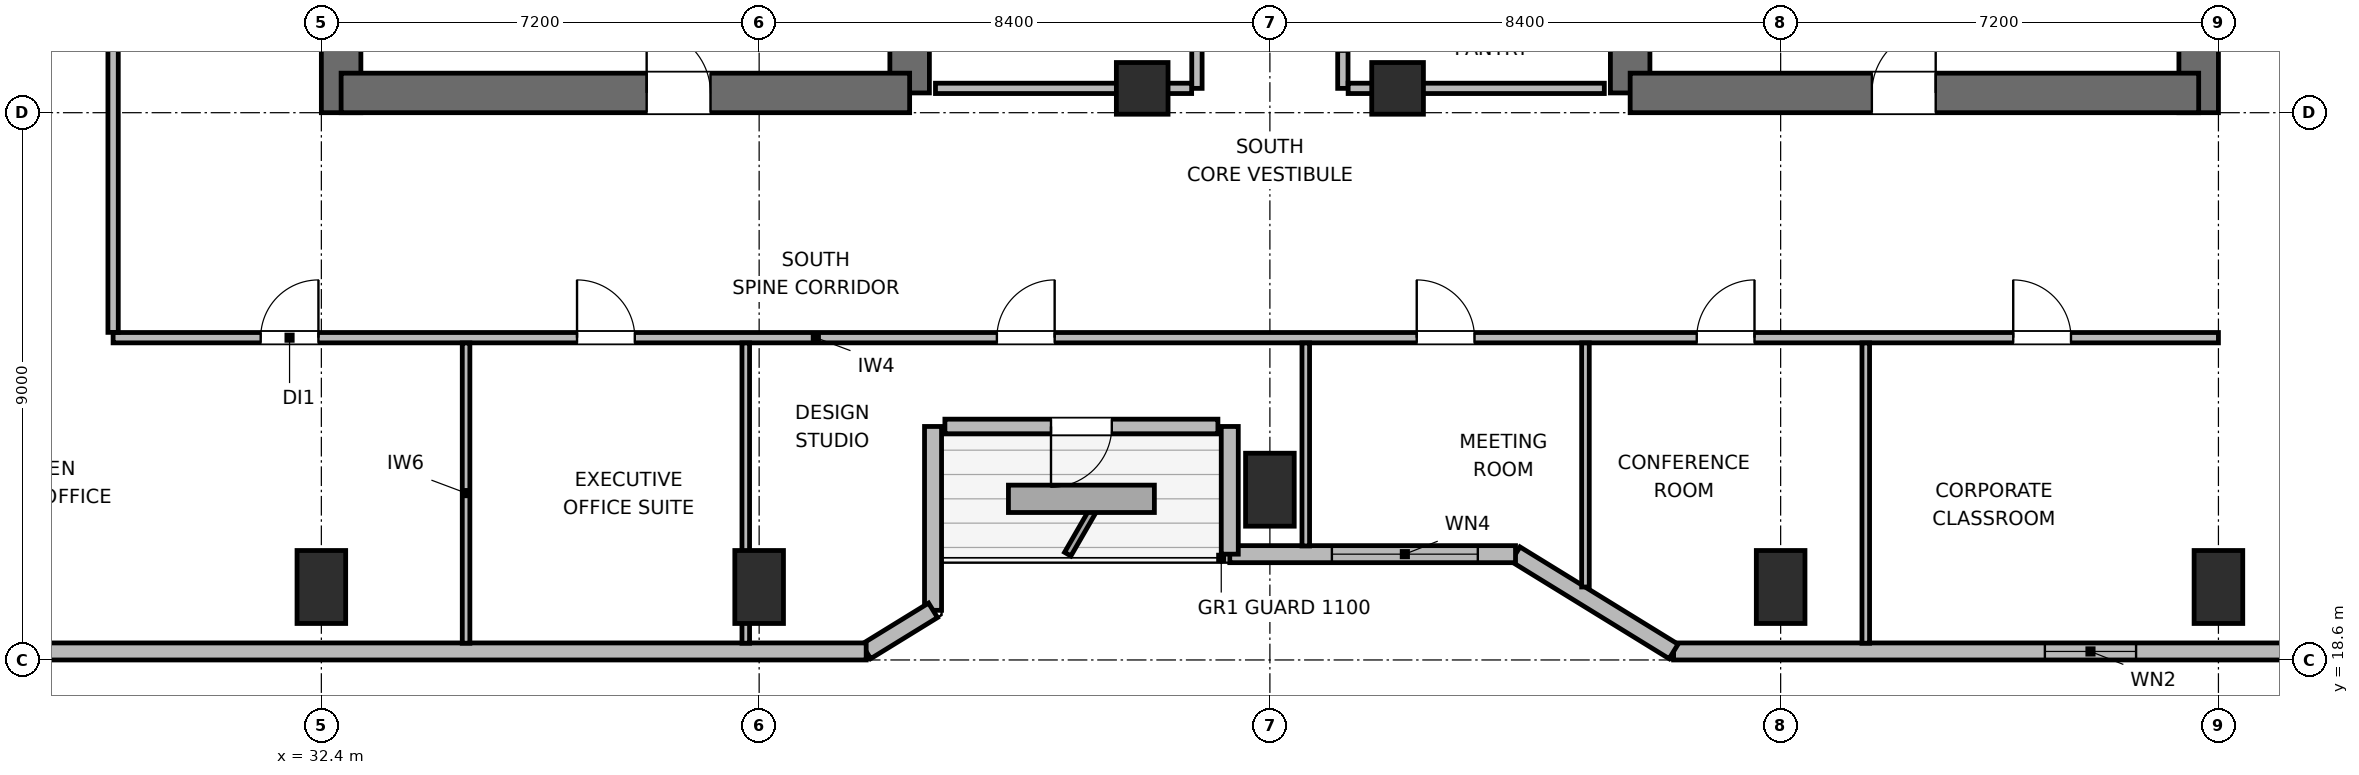
"""IFC4 building model, lengths in metres.
Left out: names, types, materials, properties, quantities, classifications, styles, units other than length and angle.
Written with IfcOpenShell. Run it as: python <this file> out.ifc"""

import sys

from ifc_helpers import new_model, si_unit, direction, frame, frame_2d, origin, origin_2d, place, context, subcontext, project, spatial, rectangle, extrude, element, fill, save


model = new_model("IFC4")
c1 = context("Model", 3, precision=1e-05, world=origin(), true_north=direction((0.0, 1.0)))
c2 = subcontext(c1, "Body", "Model", "MODEL_VIEW")
j1 = project(units=[si_unit("LENGTHUNIT", "METRE"), si_unit("PLANEANGLEUNIT", "RADIAN")], contexts=[c1])
p1 = place(None, origin())
s1 = spatial("IfcSite", under=j1, at=p1, CompositionType="ELEMENT")
p2 = place(p1, origin())
s2 = spatial("IfcBuilding", under=s1, at=p2, CompositionType="ELEMENT")
p3 = place(p2, frame((0.0, 0.0, 201.9)))
s3 = spatial("IfcBuildingStorey", under=s2, at=p3, CompositionType="ELEMENT", Elevation=201.9)
p4 = place(p3, frame((32.725, 27.6, 0.0), z_axis=(0.0, 0.0, 1.0), x_axis=(0.0, 1.0, 0.0)))
e1 = element("IfcWall", 1, at=p4, inside=s3, PredefinedType="SHEAR", context=c2, shape_type="SweptSolid", body=[
    extrude(rectangle(XDim=16.8, YDim=0.65, at=frame_2d((8.4, 0.0))), origin(), (0.0, 0.0, 1.0), 3.9),
])
p5 = place(p3, frame((42.075, 27.925, 0.0), z_axis=(0.0, 0.0, 1.0), x_axis=(0.0, 1.0, 0.0)))
e2 = element("IfcWall", 2, at=p5, inside=s3, PredefinedType="SHEAR", context=c2, shape_type="SweptSolid", body=[
    extrude(rectangle(XDim=6.475, YDim=0.65, at=frame_2d((3.237, 0.0))), origin(), (0.0, 0.0, 1.0), 3.9),
])
p6 = place(p3, frame((32.725, 27.925, 0.0), z_axis=(0.0, 0.0, 1.0), x_axis=(1.0, 0.0, 0.0)))
e3 = element("IfcWall", 3, at=p6, inside=s3, PredefinedType="SHEAR", context=c2, shape_type="SweptSolid", body=[
    extrude(rectangle(XDim=9.35, YDim=0.65, at=frame_2d((4.675, 0.0))), origin(), (0.0, 0.0, 1.0), 3.9),
])
p7 = place(p6, frame((5.025, 0.0, 0.0)))
e4 = element("IfcOpeningElement", 4, at=p7, cuts=e3, PredefinedType="OPENING", context=c2, shape_type="SweptSolid", body=[
    extrude(rectangle(XDim=1.05, YDim=2.04, at=frame_2d((0.525, 1.02))), frame((0.0, 0.335, 0.0), z_axis=(0.0, -1.0, 0.0), x_axis=(1.0, 0.0, 0.0)), (0.0, 0.0, 1.0), 0.67),
])
p8 = place(p3, frame((53.925, 27.925, 0.0), z_axis=(0.0, 0.0, 1.0), x_axis=(0.0, 1.0, 0.0)))
e5 = element("IfcWall", 5, at=p8, inside=s3, PredefinedType="SHEAR", context=c2, shape_type="SweptSolid", body=[
    extrude(rectangle(XDim=7.875, YDim=0.65, at=frame_2d((3.938, 0.0))), origin(), (0.0, 0.0, 1.0), 3.9),
])
p9 = place(p3, frame((63.275, 27.6, 0.0), z_axis=(0.0, 0.0, 1.0), x_axis=(0.0, 1.0, 0.0)))
e6 = element("IfcWall", 6, at=p9, inside=s3, PredefinedType="SHEAR", context=c2, shape_type="SweptSolid", body=[
    extrude(rectangle(XDim=16.8, YDim=0.65, at=frame_2d((8.4, 0.0))), origin(), (0.0, 0.0, 1.0), 3.9),
])
p10 = place(p3, frame((53.925, 27.925, 0.0), z_axis=(0.0, 0.0, 1.0), x_axis=(1.0, 0.0, 0.0)))
e7 = element("IfcWall", 7, at=p10, inside=s3, PredefinedType="SHEAR", context=c2, shape_type="SweptSolid", body=[
    extrude(rectangle(XDim=9.35, YDim=0.65, at=frame_2d((4.675, 0.0))), origin(), (0.0, 0.0, 1.0), 3.9),
])
p11 = place(p10, frame((3.975, 0.0, 0.0)))
e8 = element("IfcOpeningElement", 8, at=p11, cuts=e7, PredefinedType="OPENING", context=c2, shape_type="SweptSolid", body=[
    extrude(rectangle(XDim=1.05, YDim=2.04, at=frame_2d((0.525, 1.02))), frame((0.0, 0.335, 0.0), z_axis=(0.0, -1.0, 0.0), x_axis=(1.0, 0.0, 0.0)), (0.0, 0.0, 1.0), 0.67),
])
for number, where, z_axis, x_axis in (
    (9, (32.4, 19.8, 0.0), (0.0, 0.0, 1.0), (1.0, 0.0, 0.0)),
    (10, (39.6, 19.8, 0.0), (0.0, 0.0, 1.0), (1.0, 0.0, 0.0)),
    (11, (48.0, 21.4, 0.0), (0.0, 0.0, 1.0), (1.0, 0.0, 0.0)),
    (12, (56.4, 19.8, 0.0), (0.0, 0.0, 1.0), (1.0, 0.0, 0.0)),
    (13, (63.6, 19.8, 0.0), (0.0, 0.0, 1.0), (1.0, 0.0, 0.0)),
):
    element("IfcColumn", number, at=place(p3, frame(where, z_axis=z_axis, x_axis=x_axis)), inside=s3, PredefinedType="COLUMN", context=c2, shape_type="SweptSolid", body=[
        extrude(rectangle(XDim=0.8, YDim=1.2, at=origin_2d()), origin(), (0.0, 0.0, 1.0), 3.9),
    ])
for number, where, z_axis, x_axis in (
    (14, (45.9, 28.0, 0.0), (0.0, 0.0, 1.0), (1.0, 0.0, 0.0)),
    (15, (50.1, 28.0, 0.0), (0.0, 0.0, 1.0), (1.0, 0.0, 0.0)),
):
    element("IfcColumn", number, at=place(p3, frame(where, z_axis=z_axis, x_axis=x_axis)), inside=s3, PredefinedType="COLUMN", context=c2, shape_type="SweptSolid", body=[
        extrude(rectangle(XDim=0.85, YDim=0.85, at=origin_2d()), origin(), (0.0, 0.0, 1.0), 3.9),
    ])
p12 = place(p3, frame((65.382, 18.74, 0.0), z_axis=(0.0, 0.0, 1.0), x_axis=(-1.0, 0.0, 0.0)))
e16 = element("IfcWall", 16, at=p12, inside=s3, PredefinedType="SOLIDWALL", context=c2, shape_type="SweptSolid", body=[
    extrude(rectangle(XDim=10.742, YDim=0.28, at=frame_2d((5.371, 0.0))), origin(), (0.0, 0.0, 1.0), 3.68),
])
p13 = place(p12, frame((3.136, 0.0, 0.85)))
e17 = element("IfcOpeningElement", 17, at=p13, cuts=e16, PredefinedType="OPENING", context=c2, shape_type="SweptSolid", body=[
    extrude(rectangle(XDim=1.5, YDim=1.1, at=frame_2d((0.75, 0.55))), frame((0.0, 0.15, 0.0), z_axis=(0.0, -1.0, 0.0), x_axis=(1.0, 0.0, 0.0)), (0.0, 0.0, 1.0), 0.3),
])
p14 = place(p3, frame((54.64, 18.74, 0.0), z_axis=(0.0, 0.0, 1.0), x_axis=(-0.851652825334, 0.524106349037, 0.0)))
e18 = element("IfcWall", 18, at=p14, inside=s3, PredefinedType="SOLIDWALL", context=c2, shape_type="SweptSolid", body=[
    extrude(rectangle(XDim=3.053, YDim=0.28, at=frame_2d((1.526, 0.0))), origin(), (0.0, 0.0, 1.0), 2.265),
])
p15 = place(p3, frame((52.04, 20.34, 0.0), z_axis=(0.0, 0.0, 1.0), x_axis=(-1.0, 0.0, 0.0)))
e19 = element("IfcWall", 19, at=p15, inside=s3, PredefinedType="SOLIDWALL", context=c2, shape_type="SweptSolid", body=[
    extrude(rectangle(XDim=4.699, YDim=0.28, at=frame_2d((2.35, 0.0))), origin(), (0.0, 0.0, 1.0), 2.265),
])
p16 = place(p15, frame((0.62, 0.0, 0.85)))
e20 = element("IfcOpeningElement", 20, at=p16, cuts=e19, PredefinedType="OPENING", context=c2, shape_type="SweptSolid", body=[
    extrude(rectangle(XDim=2.4, YDim=1.15, at=frame_2d((1.2, 0.575))), frame((0.0, 0.15, 0.0), z_axis=(0.0, -1.0, 0.0), x_axis=(1.0, 0.0, 0.0)), (0.0, 0.0, 1.0), 0.3),
])
p17 = place(p3, frame((47.34, 20.34, 0.0), z_axis=(0.0, 0.0, 1.0), x_axis=(0.0, 1.0, 0.0)))
e21 = element("IfcWall", 21, at=p17, inside=s3, PredefinedType="SOLIDWALL", context=c2, shape_type="SweptSolid", body=[
    extrude(rectangle(XDim=2.1, YDim=0.28, at=frame_2d((1.05, 0.0))), origin(), (0.0, 0.0, 1.0), 2.265),
])
p18 = place(p3, frame((47.145, 22.44, 0.0), z_axis=(0.0, 0.0, 1.0), x_axis=(-1.0, 0.0, 0.0)))
e22 = element("IfcWall", 22, at=p18, inside=s3, PredefinedType="SOLIDWALL", context=c2, shape_type="SweptSolid", body=[
    extrude(rectangle(XDim=4.49, YDim=0.24, at=frame_2d((2.245, 0.0))), origin(), (0.0, 0.0, 1.0), 3.68),
])
p19 = place(p18, frame((1.745, 0.0, 0.0)))
e23 = element("IfcOpeningElement", 23, at=p19, cuts=e22, PredefinedType="OPENING", context=c2, shape_type="SweptSolid", body=[
    extrude(rectangle(XDim=1.0, YDim=2.02, at=frame_2d((0.5, 1.01))), frame((0.0, 0.13, 0.0), z_axis=(0.0, -1.0, 0.0), x_axis=(1.0, 0.0, 0.0)), (0.0, 0.0, 1.0), 0.26),
])
p20 = place(p3, frame((42.46, 22.44, 0.0), z_axis=(0.0, 0.0, 1.0), x_axis=(0.0, -1.0, 0.0)))
e24 = element("IfcWall", 24, at=p20, inside=s3, PredefinedType="SOLIDWALL", context=c2, shape_type="SweptSolid", body=[
    extrude(rectangle(XDim=3.024, YDim=0.28, at=frame_2d((1.512, 0.0))), origin(), (0.0, 0.0, 1.0), 2.265),
])
p21 = place(p3, frame((42.46, 19.416, 0.0), z_axis=(0.0, 0.0, 1.0), x_axis=(-0.851801140441, -0.523865266212, 0.0)))
e25 = element("IfcWall", 25, at=p21, inside=s3, PredefinedType="SOLIDWALL", context=c2, shape_type="SweptSolid", body=[
    extrude(rectangle(XDim=1.291, YDim=0.28, at=frame_2d((0.646, 0.0))), origin(), (0.0, 0.0, 1.0), 3.68),
])
p22 = place(p3, frame((41.36, 18.74, 0.0), z_axis=(0.0, 0.0, 1.0), x_axis=(-1.0, 0.0, 0.0)))
e26 = element("IfcWall", 26, at=p22, inside=s3, PredefinedType="SOLIDWALL", context=c2, shape_type="SweptSolid", body=[
    extrude(rectangle(XDim=17.942, YDim=0.28, at=frame_2d((8.971, 0.0))), origin(), (0.0, 0.0, 1.0), 3.68),
])
p23 = place(p3, frame((46.8, 28.0, 0.0), z_axis=(0.0, 0.0, 1.0), x_axis=(0.0, 1.0, 0.0)))
e27 = element("IfcWall", 27, at=p23, inside=s3, PredefinedType="PARTITIONING", context=c2, shape_type="SweptSolid", body=[
    extrude(rectangle(XDim=4.5, YDim=0.17, at=frame_2d((2.25, 0.0))), origin(), (0.0, 0.0, 1.0), 3.68),
])
p24 = place(p23, frame((1.8, 0.0, 0.0)))
e28 = element("IfcOpeningElement", 28, at=p24, cuts=e27, PredefinedType="OPENING", context=c2, shape_type="SweptSolid", body=[
    extrude(rectangle(XDim=0.9, YDim=2.02, at=frame_2d((0.45, 1.01))), frame((0.0, 0.095, 0.0), z_axis=(0.0, -1.0, 0.0), x_axis=(1.0, 0.0, 0.0)), (0.0, 0.0, 1.0), 0.19),
])
p25 = place(p3, frame((42.5, 28.0, 0.0), z_axis=(0.0, 0.0, 1.0), x_axis=(1.0, 0.0, 0.0)))
e29 = element("IfcWall", 29, at=p25, inside=s3, PredefinedType="PARTITIONING", context=c2, shape_type="SweptSolid", body=[
    extrude(rectangle(XDim=4.213, YDim=0.17, at=frame_2d((2.106, 0.0))), origin(), (0.0, 0.0, 1.0), 2.765),
])
p26 = place(p3, frame((49.2, 28.0, 0.0), z_axis=(0.0, 0.0, 1.0), x_axis=(0.0, 1.0, 0.0)))
e30 = element("IfcWall", 30, at=p26, inside=s3, PredefinedType="PARTITIONING", context=c2, shape_type="SweptSolid", body=[
    extrude(rectangle(XDim=4.5, YDim=0.17, at=frame_2d((2.25, 0.0))), origin(), (0.0, 0.0, 1.0), 3.68),
])
p27 = place(p26, frame((0.605, 0.0, 0.0)))
e31 = element("IfcOpeningElement", 31, at=p27, cuts=e30, PredefinedType="OPENING", context=c2, shape_type="SweptSolid", body=[
    extrude(rectangle(XDim=0.9, YDim=2.02, at=frame_2d((0.45, 1.01))), frame((0.0, 0.095, 0.0), z_axis=(0.0, -1.0, 0.0), x_axis=(1.0, 0.0, 0.0)), (0.0, 0.0, 1.0), 0.19),
])
p28 = place(p26, frame((2.655, 0.0, 0.0)))
e32 = element("IfcOpeningElement", 32, at=p28, cuts=e30, PredefinedType="OPENING", context=c2, shape_type="SweptSolid", body=[
    extrude(rectangle(XDim=0.9, YDim=2.02, at=frame_2d((0.45, 1.01))), frame((0.0, 0.095, 0.0), z_axis=(0.0, -1.0, 0.0), x_axis=(1.0, 0.0, 0.0)), (0.0, 0.0, 1.0), 0.19),
])
p29 = place(p3, frame((49.287, 28.0, 0.0), z_axis=(0.0, 0.0, 1.0), x_axis=(1.0, 0.0, 0.0)))
e33 = element("IfcWall", 33, at=p29, inside=s3, PredefinedType="PARTITIONING", context=c2, shape_type="SweptSolid", body=[
    extrude(rectangle(XDim=4.213, YDim=0.17, at=frame_2d((2.106, 0.0))), origin(), (0.0, 0.0, 1.0), 2.765),
])
p30 = place(p3, frame((28.975, 23.9, 0.0), z_axis=(0.0, 0.0, 1.0), x_axis=(1.0, 0.0, 0.0)))
e34 = element("IfcWall", 34, at=p30, inside=s3, PredefinedType="PARTITIONING", context=c2, shape_type="SweptSolid", body=[
    extrude(rectangle(XDim=34.625, YDim=0.17, at=frame_2d((17.312, 0.0))), origin(), (0.0, 0.0, 1.0), 3.68),
])
p31 = place(p30, frame((2.427, 0.0, 0.0)))
e35 = element("IfcOpeningElement", 35, at=p31, cuts=e34, PredefinedType="OPENING", context=c2, shape_type="SweptSolid", body=[
    extrude(rectangle(XDim=0.95, YDim=2.04, at=frame_2d((0.475, 1.02))), frame((0.0, 0.095, 0.0), z_axis=(0.0, -1.0, 0.0), x_axis=(1.0, 0.0, 0.0)), (0.0, 0.0, 1.0), 0.19),
])
p32 = place(p30, frame((7.63, 0.0, 0.0)))
e36 = element("IfcOpeningElement", 36, at=p32, cuts=e34, PredefinedType="OPENING", context=c2, shape_type="SweptSolid", body=[
    extrude(rectangle(XDim=0.95, YDim=2.04, at=frame_2d((0.475, 1.02))), frame((0.0, 0.095, 0.0), z_axis=(0.0, -1.0, 0.0), x_axis=(1.0, 0.0, 0.0)), (0.0, 0.0, 1.0), 0.19),
])
p33 = place(p30, frame((14.535, 0.0, 0.0)))
e37 = element("IfcOpeningElement", 37, at=p33, cuts=e34, PredefinedType="OPENING", context=c2, shape_type="SweptSolid", body=[
    extrude(rectangle(XDim=0.95, YDim=2.04, at=frame_2d((0.475, 1.02))), frame((0.0, 0.095, 0.0), z_axis=(0.0, -1.0, 0.0), x_axis=(1.0, 0.0, 0.0)), (0.0, 0.0, 1.0), 0.19),
])
p34 = place(p30, frame((21.44, 0.0, 0.0)))
e38 = element("IfcOpeningElement", 38, at=p34, cuts=e34, PredefinedType="OPENING", context=c2, shape_type="SweptSolid", body=[
    extrude(rectangle(XDim=0.95, YDim=2.04, at=frame_2d((0.475, 1.02))), frame((0.0, 0.095, 0.0), z_axis=(0.0, -1.0, 0.0), x_axis=(1.0, 0.0, 0.0)), (0.0, 0.0, 1.0), 0.19),
])
p35 = place(p30, frame((26.045, 0.0, 0.0)))
e39 = element("IfcOpeningElement", 39, at=p35, cuts=e34, PredefinedType="OPENING", context=c2, shape_type="SweptSolid", body=[
    extrude(rectangle(XDim=0.95, YDim=2.04, at=frame_2d((0.475, 1.02))), frame((0.0, 0.095, 0.0), z_axis=(0.0, -1.0, 0.0), x_axis=(1.0, 0.0, 0.0)), (0.0, 0.0, 1.0), 0.19),
])
p36 = place(p30, frame((31.25, 0.0, 0.0)))
e40 = element("IfcOpeningElement", 40, at=p36, cuts=e34, PredefinedType="OPENING", context=c2, shape_type="SweptSolid", body=[
    extrude(rectangle(XDim=0.95, YDim=2.04, at=frame_2d((0.475, 1.02))), frame((0.0, 0.095, 0.0), z_axis=(0.0, -1.0, 0.0), x_axis=(1.0, 0.0, 0.0)), (0.0, 0.0, 1.0), 0.19),
])
p37 = place(p3, frame((28.975, 23.987, 0.0), z_axis=(0.0, 0.0, 1.0), x_axis=(0.0, 1.0, 0.0)))
e41 = element("IfcWall", 41, at=p37, inside=s3, PredefinedType="PARTITIONING", context=c2, shape_type="SweptSolid", body=[
    extrude(rectangle(XDim=10.413, YDim=0.17, at=frame_2d((5.207, 0.0))), origin(), (0.0, 0.0, 1.0), 3.68),
])
p38 = place(p37, frame((4.688, 0.0, 0.0)))
e42 = element("IfcOpeningElement", 42, at=p38, cuts=e41, PredefinedType="OPENING", context=c2, shape_type="SweptSolid", body=[
    extrude(rectangle(XDim=0.95, YDim=2.04, at=frame_2d((0.475, 1.02))), frame((0.0, 0.095, 0.0), z_axis=(0.0, -1.0, 0.0), x_axis=(1.0, 0.0, 0.0)), (0.0, 0.0, 1.0), 0.19),
])
p39 = place(p3, frame((34.78, 18.875, 0.0), z_axis=(0.0, 0.0, 1.0), x_axis=(0.0, 1.0, 0.0)))
e43 = element("IfcWall", 43, at=p39, inside=s3, PredefinedType="PARTITIONING", context=c2, shape_type="SweptSolid", body=[
    extrude(rectangle(XDim=4.938, YDim=0.125, at=frame_2d((2.469, 0.0))), origin(), (0.0, 0.0, 1.0), 3.68),
])
p40 = place(p3, frame((39.38, 18.875, 0.0), z_axis=(0.0, 0.0, 1.0), x_axis=(0.0, 1.0, 0.0)))
e44 = element("IfcWall", 44, at=p40, inside=s3, PredefinedType="PARTITIONING", context=c2, shape_type="SweptSolid", body=[
    extrude(rectangle(XDim=4.938, YDim=0.125, at=frame_2d((2.469, 0.0))), origin(), (0.0, 0.0, 1.0), 3.043),
])
p41 = place(p3, frame((48.59, 20.475, 0.0), z_axis=(0.0, 0.0, 1.0), x_axis=(0.0, 1.0, 0.0)))
e45 = element("IfcWall", 45, at=p41, inside=s3, PredefinedType="PARTITIONING", context=c2, shape_type="SweptSolid", body=[
    extrude(rectangle(XDim=3.338, YDim=0.125, at=frame_2d((1.669, 0.0))), origin(), (0.0, 0.0, 1.0), 3.68),
])
p42 = place(p3, frame((53.19, 19.8, 0.0), z_axis=(0.0, 0.0, 1.0), x_axis=(0.0, 1.0, 0.0)))
e46 = element("IfcWall", 46, at=p42, inside=s3, PredefinedType="PARTITIONING", context=c2, shape_type="SweptSolid", body=[
    extrude(rectangle(XDim=4.013, YDim=0.125, at=frame_2d((2.006, 0.0))), origin(), (0.0, 0.0, 1.0), 3.043),
])
p43 = place(p3, frame((57.8, 18.875, 0.0), z_axis=(0.0, 0.0, 1.0), x_axis=(0.0, 1.0, 0.0)))
e47 = element("IfcWall", 47, at=p43, inside=s3, PredefinedType="PARTITIONING", context=c2, shape_type="SweptSolid", body=[
    extrude(rectangle(XDim=4.938, YDim=0.125, at=frame_2d((2.469, 0.0))), origin(), (0.0, 0.0, 1.0), 3.68),
])
p44 = place(p13, origin())
e48 = element("IfcWindow", 48, at=p44, inside=s3, PartitioningType="SINGLE_PANEL", PredefinedType="WINDOW", context=c2, shape_type="SweptSolid", body=[
    extrude(rectangle(XDim=1.5, YDim=1.1, at=frame_2d((0.75, 0.55))), frame((0.0, 0.03, 0.0), z_axis=(0.0, -1.0, 0.0), x_axis=(1.0, 0.0, 0.0)), (0.0, 0.0, 1.0), 0.06),
])
fill(e17, e48)
p45 = place(p16, origin())
e49 = element("IfcWindow", 49, at=p45, inside=s3, PartitioningType="SINGLE_PANEL", PredefinedType="WINDOW", context=c2, shape_type="SweptSolid", body=[
    extrude(rectangle(XDim=2.4, YDim=1.15, at=frame_2d((1.2, 0.575))), frame((0.0, 0.03, 0.0), z_axis=(0.0, -1.0, 0.0), x_axis=(1.0, 0.0, 0.0)), (0.0, 0.0, 1.0), 0.06),
])
fill(e20, e49)
p46 = place(p19, origin())
e50 = element("IfcDoor", 50, at=p46, inside=s3, OperationType="SINGLE_SWING_RIGHT", PredefinedType="DOOR", context=c2, shape_type="SweptSolid", body=[
    extrude(rectangle(XDim=1.0, YDim=2.02, at=frame_2d((0.5, 1.01))), frame((0.0, 0.025, 0.0), z_axis=(0.0, -1.0, 0.0), x_axis=(1.0, 0.0, 0.0)), (0.0, 0.0, 1.0), 0.05),
])
fill(e23, e50)
p47 = place(p7, origin())
e51 = element("IfcDoor", 51, at=p47, inside=s3, OperationType="SINGLE_SWING_LEFT", PredefinedType="DOOR", context=c2, shape_type="SweptSolid", body=[
    extrude(rectangle(XDim=1.05, YDim=2.04, at=frame_2d((0.525, 1.02))), frame((0.0, 0.025, 0.0), z_axis=(0.0, -1.0, 0.0), x_axis=(1.0, 0.0, 0.0)), (0.0, 0.0, 1.0), 0.05),
])
fill(e4, e51)
p48 = place(p11, origin())
e52 = element("IfcDoor", 52, at=p48, inside=s3, OperationType="SINGLE_SWING_RIGHT", PredefinedType="DOOR", context=c2, shape_type="SweptSolid", body=[
    extrude(rectangle(XDim=1.05, YDim=2.04, at=frame_2d((0.525, 1.02))), frame((0.0, 0.025, 0.0), z_axis=(0.0, -1.0, 0.0), x_axis=(1.0, 0.0, 0.0)), (0.0, 0.0, 1.0), 0.05),
])
fill(e8, e52)
p49 = place(p31, origin())
e53 = element("IfcDoor", 53, at=p49, inside=s3, OperationType="SINGLE_SWING_RIGHT", PredefinedType="DOOR", context=c2, shape_type="SweptSolid", body=[
    extrude(rectangle(XDim=0.95, YDim=2.04, at=frame_2d((0.475, 1.02))), frame((0.0, 0.025, 0.0), z_axis=(0.0, -1.0, 0.0), x_axis=(1.0, 0.0, 0.0)), (0.0, 0.0, 1.0), 0.05),
])
fill(e35, e53)
p50 = place(p32, origin())
e54 = element("IfcDoor", 54, at=p50, inside=s3, OperationType="SINGLE_SWING_LEFT", PredefinedType="DOOR", context=c2, shape_type="SweptSolid", body=[
    extrude(rectangle(XDim=0.95, YDim=2.04, at=frame_2d((0.475, 1.02))), frame((0.0, 0.025, 0.0), z_axis=(0.0, -1.0, 0.0), x_axis=(1.0, 0.0, 0.0)), (0.0, 0.0, 1.0), 0.05),
])
fill(e36, e54)
p51 = place(p33, origin())
e55 = element("IfcDoor", 55, at=p51, inside=s3, OperationType="SINGLE_SWING_RIGHT", PredefinedType="DOOR", context=c2, shape_type="SweptSolid", body=[
    extrude(rectangle(XDim=0.95, YDim=2.04, at=frame_2d((0.475, 1.02))), frame((0.0, 0.025, 0.0), z_axis=(0.0, -1.0, 0.0), x_axis=(1.0, 0.0, 0.0)), (0.0, 0.0, 1.0), 0.05),
])
fill(e37, e55)
p52 = place(p34, origin())
e56 = element("IfcDoor", 56, at=p52, inside=s3, OperationType="SINGLE_SWING_LEFT", PredefinedType="DOOR", context=c2, shape_type="SweptSolid", body=[
    extrude(rectangle(XDim=0.95, YDim=2.04, at=frame_2d((0.475, 1.02))), frame((0.0, 0.025, 0.0), z_axis=(0.0, -1.0, 0.0), x_axis=(1.0, 0.0, 0.0)), (0.0, 0.0, 1.0), 0.05),
])
fill(e38, e56)
p53 = place(p35, origin())
e57 = element("IfcDoor", 57, at=p53, inside=s3, OperationType="SINGLE_SWING_RIGHT", PredefinedType="DOOR", context=c2, shape_type="SweptSolid", body=[
    extrude(rectangle(XDim=0.95, YDim=2.04, at=frame_2d((0.475, 1.02))), frame((0.0, 0.025, 0.0), z_axis=(0.0, -1.0, 0.0), x_axis=(1.0, 0.0, 0.0)), (0.0, 0.0, 1.0), 0.05),
])
fill(e39, e57)
p54 = place(p36, origin())
e58 = element("IfcDoor", 58, at=p54, inside=s3, OperationType="SINGLE_SWING_LEFT", PredefinedType="DOOR", context=c2, shape_type="SweptSolid", body=[
    extrude(rectangle(XDim=0.95, YDim=2.04, at=frame_2d((0.475, 1.02))), frame((0.0, 0.025, 0.0), z_axis=(0.0, -1.0, 0.0), x_axis=(1.0, 0.0, 0.0)), (0.0, 0.0, 1.0), 0.05),
])
fill(e40, e58)
save(model, sys.argv[1])
